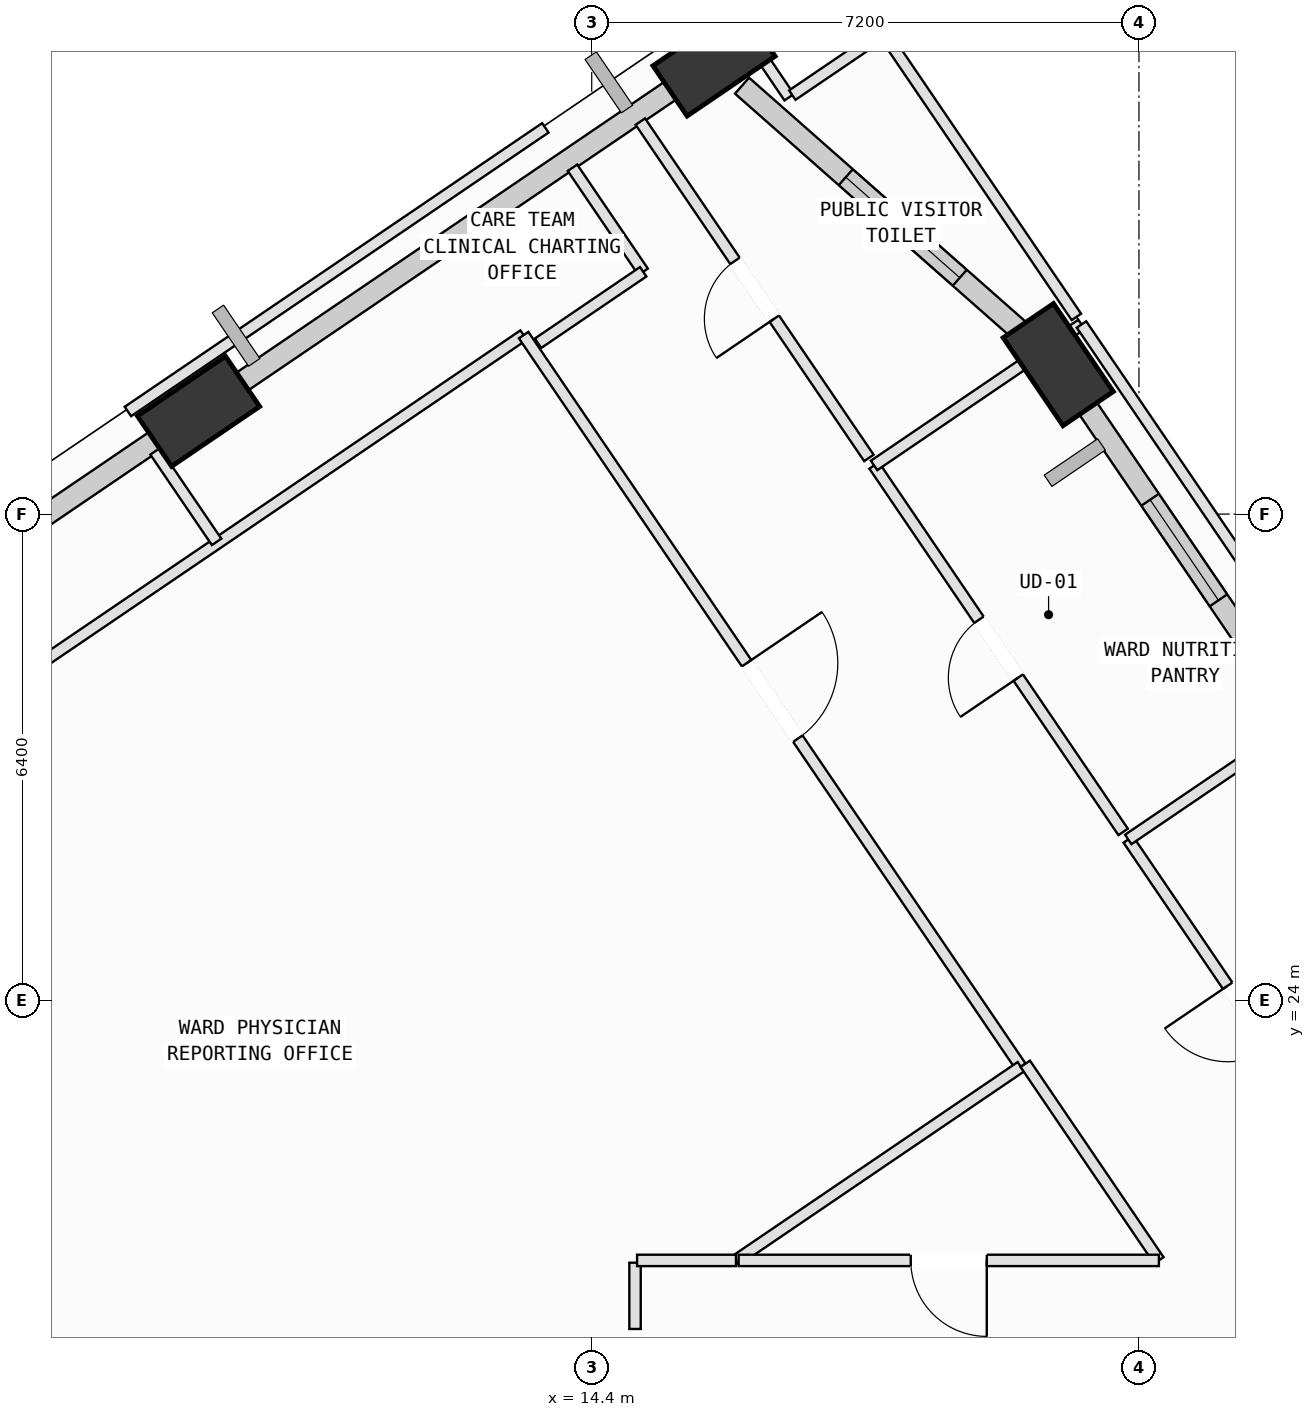
"""IFC4 building model, lengths in metres.
Left out: names, types, materials, properties, quantities, classifications, styles, units other than length and angle.
Written with IfcOpenShell. Run it as: python <this file> out.ifc"""

import sys

from ifc_helpers import new_model, si_unit, direction, frame, frame_2d, origin, origin_2d, place, context, subcontext, project, spatial, rectangle, extrude, element, fill, save


model = new_model("IFC4")
c1 = context("Model", 3, precision=1e-05, world=origin(), true_north=direction((0.0, 1.0)))
c2 = subcontext(c1, "Body", "Model", "MODEL_VIEW")
j1 = project(units=[si_unit("LENGTHUNIT", "METRE"), si_unit("PLANEANGLEUNIT", "RADIAN")], contexts=[c1])
p1 = place(None, origin())
s1 = spatial("IfcSite", under=j1, at=p1, CompositionType="ELEMENT")
p2 = place(p1, origin())
s2 = spatial("IfcBuilding", under=s1, at=p2, CompositionType="ELEMENT")
p3 = place(p2, frame((0.0, 0.0, 169.8)))
s3 = spatial("IfcBuildingStorey", under=s2, at=p3, CompositionType="ELEMENT", Elevation=169.8)
p4 = place(p3, frame((20.538, 32.366, 0.002), z_axis=(-0.030851806234, -0.054265034679, 0.998049834459), x_axis=(-0.080649330283, 0.995404549796, 0.051628168379)))
e1 = element("IfcColumn", 1, at=p4, inside=s3, PredefinedType="COLUMN", context=c2, shape_type="SweptSolid", body=[
    extrude(rectangle(XDim=1.4, YDim=0.8, at=origin_2d()), origin(), (0.0, 0.0, 1.0), 4.004),
])
p5 = place(p3, frame((16.009, 36.362, 0.002), z_axis=(-0.047105602248, -0.07303194147, 0.996216541602), x_axis=(0.99855811031, 0.022260915864, 0.048848254409)))
e2 = element("IfcColumn", 2, at=p5, inside=s3, PredefinedType="COLUMN", context=c2, shape_type="SweptSolid", body=[
    extrude(rectangle(XDim=1.4, YDim=0.8, at=origin_2d()), origin(), (0.0, 0.0, 1.0), 4.011),
])
p6 = place(p3, frame((9.227, 31.753, 0.002), z_axis=(-0.027826504823, -0.10073437772, 0.994524142882), x_axis=(0.946066222421, 0.318603384358, 0.058741691071)))
e3 = element("IfcColumn", 3, at=p6, inside=s3, PredefinedType="COLUMN", context=c2, shape_type="SweptSolid", body=[
    extrude(rectangle(XDim=1.4, YDim=0.8, at=origin_2d()), origin(), (0.0, 0.0, 1.0), 4.018),
])
p7 = place(p3, frame((24.339, 26.774, 0.0), z_axis=(0.0, 0.0, 1.0), x_axis=(-0.56206639417, 0.827092116118, 0.0)))
e4 = element("IfcWall", 4, at=p7, inside=s3, PredefinedType="SOLIDWALL", context=c2, shape_type="SweptSolid", body=[
    extrude(rectangle(XDim=6.223, YDim=0.28, at=frame_2d((3.111, 0.0))), origin(), (0.0, 0.0, 1.0), 3.145),
])
p8 = place(p7, frame((3.011, 0.0, 0.75)))
e5 = element("IfcOpeningElement", 5, at=p8, cuts=e4, PredefinedType="OPENING", context=c2, shape_type="SweptSolid", body=[
    extrude(rectangle(XDim=1.6, YDim=1.95, at=frame_2d((0.8, 0.975))), frame((0.0, 0.15, 0.0), z_axis=(0.0, -1.0, 0.0), x_axis=(1.0, 0.0, 0.0)), (0.0, 0.0, 1.0), 0.3),
])
p9 = place(p3, frame((16.378, 36.037, 0.0), z_axis=(0.0, 0.0, 1.0), x_axis=(0.74990080613, -0.661550286045, 0.0)))
e6 = element("IfcWall", 6, at=p9, inside=s3, PredefinedType="SOLIDWALL", context=c2, shape_type="SweptSolid", body=[
    extrude(rectangle(XDim=5.093, YDim=0.28, at=frame_2d((2.546, 0.0))), origin(), (0.0, 0.0, 1.0), 3.145),
])
p10 = place(p9, frame((1.82, 0.0, 0.75)))
e7 = element("IfcOpeningElement", 7, at=p10, cuts=e6, PredefinedType="OPENING", context=c2, shape_type="SweptSolid", body=[
    extrude(rectangle(XDim=2.0, YDim=1.95, at=frame_2d((1.0, 0.975))), frame((0.0, 0.15, 0.0), z_axis=(0.0, -1.0, 0.0), x_axis=(1.0, 0.0, 0.0)), (0.0, 0.0, 1.0), 0.3),
])
p11 = place(p3, frame((9.49, 31.931, 0.0), z_axis=(0.0, 0.0, 1.0), x_axis=(0.827077196418, 0.562088348184, 0.0)))
e8 = element("IfcWall", 8, at=p11, inside=s3, PredefinedType="SOLIDWALL", context=c2, shape_type="SweptSolid", body=[
    extrude(rectangle(XDim=7.23, YDim=0.28, at=frame_2d((3.615, 0.0))), origin(), (0.0, 0.0, 1.0), 3.165),
])
p12 = place(p3, frame((2.688, 27.308, 0.0), z_axis=(0.0, 0.0, 1.0), x_axis=(0.827083252046, 0.562079437611, 0.0)))
e9 = element("IfcWall", 9, at=p12, inside=s3, PredefinedType="SOLIDWALL", context=c2, shape_type="SweptSolid", body=[
    extrude(rectangle(XDim=7.27, YDim=0.28, at=frame_2d((3.635, 0.0))), origin(), (0.0, 0.0, 1.0), 3.165),
])
p13 = place(p3, frame((14.97, 20.55, 0.0), z_axis=(0.0, 0.0, 1.0), x_axis=(0.0, -1.0, 0.0)))
e10 = element("IfcWall", 10, at=p13, inside=s3, PredefinedType="PARTITIONING", context=c2, shape_type="SweptSolid", body=[
    extrude(rectangle(XDim=0.872, YDim=0.15, at=frame_2d((0.436, 0.0))), origin(), (0.0, 0.0, 1.0), 3.78),
])
p14 = place(p3, frame((2.528, 25.296, 0.0), z_axis=(0.0, 0.0, 1.0), x_axis=(0.827086951532, 0.562073993888, 0.0)))
e11 = element("IfcWall", 11, at=p14, inside=s3, PredefinedType="PARTITIONING", context=c2, shape_type="SweptSolid", body=[
    extrude(rectangle(XDim=13.271, YDim=0.15, at=frame_2d((6.635, 0.0))), origin(), (0.0, 0.0, 1.0), 3.78),
])
p15 = place(p3, frame((13.504, 32.755, 0.0), z_axis=(0.0, 0.0, 1.0), x_axis=(0.562055261363, -0.827099681522, 0.0)))
e12 = element("IfcWall", 12, at=p15, inside=s3, PredefinedType="PARTITIONING", context=c2, shape_type="SweptSolid", body=[
    extrude(rectangle(XDim=11.639, YDim=0.15, at=frame_2d((5.82, 0.0))), origin(), (0.0, 0.0, 1.0), 3.78),
])
p16 = place(p15, frame((5.22, 0.0, 0.0)))
e13 = element("IfcOpeningElement", 13, at=p16, cuts=e12, PredefinedType="OPENING", context=c2, shape_type="SweptSolid", body=[
    extrude(rectangle(XDim=1.2, YDim=2.15, at=frame_2d((0.6, 1.075))), frame((0.0, 0.085, 0.0), z_axis=(0.0, -1.0, 0.0), x_axis=(1.0, 0.0, 0.0)), (0.0, 0.0, 1.0), 0.17),
])
p17 = place(p3, frame((20.046, 23.128, 0.0), z_axis=(0.0, 0.0, 1.0), x_axis=(-0.826993630253, -0.562211290816, 0.0)))
e14 = element("IfcWall", 14, at=p17, inside=s3, PredefinedType="PARTITIONING", context=c2, shape_type="SweptSolid", body=[
    extrude(rectangle(XDim=4.532, YDim=0.15, at=frame_2d((2.266, 0.0))), origin(), (0.0, 0.0, 1.0), 3.78),
])
p18 = place(p3, frame((16.298, 20.58, 0.0), z_axis=(0.0, 0.0, 1.0), x_axis=(-1.0, 0.0, 0.0)))
e15 = element("IfcWall", 15, at=p18, inside=s3, PredefinedType="PARTITIONING", context=c2, shape_type="SweptSolid", body=[
    extrude(rectangle(XDim=1.301, YDim=0.15, at=frame_2d((0.65, 0.0))), origin(), (0.0, 0.0, 1.0), 3.78),
])
p19 = place(p3, frame((24.638, 21.442, 0.0), z_axis=(0.0, 0.0, 1.0), x_axis=(-0.56213996743, 0.827042113207, 0.0)))
e16 = element("IfcWall", 16, at=p19, inside=s3, PredefinedType="PARTITIONING", context=c2, shape_type="SweptSolid", body=[
    extrude(rectangle(XDim=5.655, YDim=0.15, at=frame_2d((2.828, 0.0))), origin(), (0.0, 0.0, 1.0), 3.415),
])
p20 = place(p19, frame((2.328, 0.0, 0.0)))
e17 = element("IfcOpeningElement", 17, at=p20, cuts=e16, PredefinedType="OPENING", context=c2, shape_type="SweptSolid", body=[
    extrude(rectangle(XDim=1.0, YDim=2.12, at=frame_2d((0.5, 1.06))), frame((0.0, 0.085, 0.0), z_axis=(0.0, -1.0, 0.0), x_axis=(1.0, 0.0, 0.0)), (0.0, 0.0, 1.0), 0.17),
])
p21 = place(p3, frame((21.459, 26.119, 0.0), z_axis=(0.0, 0.0, 1.0), x_axis=(0.827129756528, 0.562011001552, 0.0)))
e18 = element("IfcWall", 18, at=p21, inside=s3, PredefinedType="PARTITIONING", context=c2, shape_type="SweptSolid", body=[
    extrude(rectangle(XDim=2.635, YDim=0.15, at=frame_2d((1.318, 0.0))), origin(), (0.0, 0.0, 1.0), 3.78),
])
p22 = place(p3, frame((21.392, 26.218, 0.0), z_axis=(0.0, 0.0, 1.0), x_axis=(-0.562090088282, 0.827076013831, 0.0)))
e19 = element("IfcWall", 19, at=p22, inside=s3, PredefinedType="PARTITIONING", context=c2, shape_type="SweptSolid", body=[
    extrude(rectangle(XDim=5.83, YDim=0.15, at=frame_2d((2.915, 0.0))), origin(), (0.0, 0.0, 1.0), 3.78),
])
p23 = place(p22, frame((2.455, 0.0, 0.0)))
e20 = element("IfcOpeningElement", 20, at=p23, cuts=e19, PredefinedType="OPENING", context=c2, shape_type="SweptSolid", body=[
    extrude(rectangle(XDim=0.92, YDim=2.1, at=frame_2d((0.46, 1.05))), frame((0.0, 0.085, 0.0), z_axis=(0.0, -1.0, 0.0), x_axis=(1.0, 0.0, 0.0)), (0.0, 0.0, 1.0), 0.17),
])
p24 = place(p3, frame((18.115, 31.04, 0.0), z_axis=(0.0, 0.0, 1.0), x_axis=(0.827031073884, 0.562156208567, 0.0)))
e21 = element("IfcWall", 21, at=p24, inside=s3, PredefinedType="PARTITIONING", context=c2, shape_type="SweptSolid", body=[
    extrude(rectangle(XDim=3.3, YDim=0.15, at=frame_2d((1.65, 0.0))), origin(), (0.0, 0.0, 1.0), 3.78),
])
p25 = place(p3, frame((20.844, 32.895, 0.0), z_axis=(0.0, 0.0, 1.0), x_axis=(0.562090088282, -0.827076013831, 0.0)))
e22 = element("IfcWall", 22, at=p25, inside=s3, PredefinedType="PARTITIONING", context=c2, shape_type="SweptSolid", body=[
    extrude(rectangle(XDim=5.83, YDim=0.15, at=frame_2d((2.915, 0.0))), origin(), (0.0, 0.0, 1.0), 3.78),
])
p26 = place(p3, frame((18.239, 36.728, 0.0), z_axis=(0.0, 0.0, 1.0), x_axis=(0.562139923025, -0.827042143389, 0.0)))
e23 = element("IfcWall", 23, at=p26, inside=s3, PredefinedType="PARTITIONING", context=c2, shape_type="SweptSolid", body=[
    extrude(rectangle(XDim=4.515, YDim=0.15, at=frame_2d((2.258, 0.0))), origin(), (0.0, 0.0, 1.0), 3.78),
])
p27 = place(p3, frame((18.047, 31.139, 0.0), z_axis=(0.0, 0.0, 1.0), x_axis=(-0.562060362882, 0.827096214764, 0.0)))
e24 = element("IfcWall", 24, at=p27, inside=s3, PredefinedType="PARTITIONING", context=c2, shape_type="SweptSolid", body=[
    extrude(rectangle(XDim=5.35, YDim=0.15, at=frame_2d((2.675, 0.0))), origin(), (0.0, 0.0, 1.0), 3.78),
])
p28 = place(p27, frame((2.215, 0.0, 0.0)))
e25 = element("IfcOpeningElement", 25, at=p28, cuts=e24, PredefinedType="OPENING", context=c2, shape_type="SweptSolid", body=[
    extrude(rectangle(XDim=0.92, YDim=2.1, at=frame_2d((0.46, 1.05))), frame((0.0, 0.085, 0.0), z_axis=(0.0, -1.0, 0.0), x_axis=(1.0, 0.0, 0.0)), (0.0, 0.0, 1.0), 0.17),
])
p29 = place(p3, frame((15.363, 36.152, 0.0), z_axis=(0.0, 0.0, 1.0), x_axis=(0.82720957027, 0.561893519143, 0.0)))
e26 = element("IfcWall", 26, at=p29, inside=s3, PredefinedType="PARTITIONING", context=c2, shape_type="SweptSolid", body=[
    extrude(rectangle(XDim=1.203, YDim=0.15, at=frame_2d((0.601, 0.0))), origin(), (0.0, 0.0, 1.0), 3.165),
])
p30 = place(p3, frame((16.386, 36.787, 0.0), z_axis=(0.0, 0.0, 1.0), x_axis=(0.56145212795, -0.827509219296, 0.0)))
e27 = element("IfcWall", 27, at=p30, inside=s3, PredefinedType="PARTITIONING", context=c2, shape_type="SweptSolid", body=[
    extrude(rectangle(XDim=1.09, YDim=0.15, at=frame_2d((0.545, 0.0))), origin(), (0.0, 0.0, 1.0), 3.78),
])
p31 = place(p3, frame((17.039, 35.913, 0.0), z_axis=(0.0, 0.0, 1.0), x_axis=(0.827328250974, 0.561718759825, 0.0)))
e28 = element("IfcWall", 28, at=p31, inside=s3, PredefinedType="PARTITIONING", context=c2, shape_type="SweptSolid", body=[
    extrude(rectangle(XDim=1.401, YDim=0.15, at=frame_2d((0.7, 0.0))), origin(), (0.0, 0.0, 1.0), 3.78),
])
p32 = place(p3, frame((20.104, 23.167, 0.0), z_axis=(0.0, 0.0, 1.0), x_axis=(0.562081553658, -0.827081813993, 0.0)))
e29 = element("IfcWall", 29, at=p32, inside=s3, PredefinedType="PARTITIONING", context=c2, shape_type="SweptSolid", body=[
    extrude(rectangle(XDim=3.128, YDim=0.15, at=frame_2d((1.564, 0.0))), origin(), (0.0, 0.0, 1.0), 3.78),
])
p33 = place(p3, frame((21.862, 20.58, 0.0), z_axis=(0.0, 0.0, 1.0), x_axis=(-1.0, 0.0, 0.0)))
e30 = element("IfcWall", 30, at=p33, inside=s3, PredefinedType="PARTITIONING", context=c2, shape_type="SweptSolid", body=[
    extrude(rectangle(XDim=5.529, YDim=0.15, at=frame_2d((2.765, 0.0))), origin(), (0.0, 0.0, 1.0), 3.78),
])
p34 = place(p33, frame((2.264, 0.0, 0.0)))
e31 = element("IfcOpeningElement", 31, at=p34, cuts=e30, PredefinedType="OPENING", context=c2, shape_type="SweptSolid", body=[
    extrude(rectangle(XDim=1.0, YDim=2.12, at=frame_2d((0.5, 1.06))), frame((0.0, 0.085, 0.0), z_axis=(0.0, -1.0, 0.0), x_axis=(1.0, 0.0, 0.0)), (0.0, 0.0, 1.0), 0.17),
])
p35 = place(p3, frame((9.465, 30.034, 0.0), z_axis=(0.0, 0.0, 1.0), x_axis=(-0.562342471098, 0.826904435349, 0.0)))
e32 = element("IfcWall", 32, at=p35, inside=s3, PredefinedType="PARTITIONING", context=c2, shape_type="SweptSolid", body=[
    extrude(rectangle(XDim=1.44, YDim=0.15, at=frame_2d((0.72, 0.0))), origin(), (0.0, 0.0, 1.0), 3.78),
])
p36 = place(p3, frame((8.298, 31.75, 0.0), z_axis=(0.0, 0.0, 1.0), x_axis=(0.827107686856, 0.56204348083, 0.0)))
e33 = element("IfcWall", 33, at=p36, inside=s3, PredefinedType="PARTITIONING", context=c2, shape_type="SweptSolid", body=[
    extrude(rectangle(XDim=6.64, YDim=0.15, at=frame_2d((3.32, 0.0))), origin(), (0.0, 0.0, 1.0), 3.78),
])
p37 = place(p3, frame((14.147, 34.957, 0.0), z_axis=(0.0, 0.0, 1.0), x_axis=(0.561862085879, -0.827230920875, 0.0)))
e34 = element("IfcWall", 34, at=p37, inside=s3, PredefinedType="PARTITIONING", context=c2, shape_type="SweptSolid", body=[
    extrude(rectangle(XDim=1.655, YDim=0.15, at=frame_2d((0.828, 0.0))), origin(), (0.0, 0.0, 1.0), 3.78),
])
p38 = place(p3, frame((15.077, 33.588, 0.0), z_axis=(0.0, 0.0, 1.0), x_axis=(-0.827029689207, -0.562158245665, 0.0)))
e35 = element("IfcWall", 35, at=p38, inside=s3, PredefinedType="PARTITIONING", context=c2, shape_type="SweptSolid", body=[
    extrude(rectangle(XDim=1.672, YDim=0.15, at=frame_2d((0.836, 0.0))), origin(), (0.0, 0.0, 1.0), 3.78),
])
p39 = place(p8, origin())
e36 = element("IfcWindow", 36, at=p39, inside=s3, PartitioningType="SINGLE_PANEL", PredefinedType="WINDOW", context=c2, shape_type="SweptSolid", body=[
    extrude(rectangle(XDim=1.6, YDim=1.95, at=frame_2d((0.8, 0.975))), frame((0.0, 0.03, 0.0), z_axis=(0.0, -1.0, 0.0), x_axis=(1.0, 0.0, 0.0)), (0.0, 0.0, 1.0), 0.06),
])
fill(e5, e36)
p40 = place(p10, origin())
e37 = element("IfcWindow", 37, at=p40, inside=s3, PartitioningType="SINGLE_PANEL", PredefinedType="WINDOW", context=c2, shape_type="SweptSolid", body=[
    extrude(rectangle(XDim=2.0, YDim=1.95, at=frame_2d((1.0, 0.975))), frame((0.0, 0.03, 0.0), z_axis=(0.0, -1.0, 0.0), x_axis=(1.0, 0.0, 0.0)), (0.0, 0.0, 1.0), 0.06),
])
fill(e7, e37)
p41 = place(p16, origin())
e38 = element("IfcDoor", 38, at=p41, inside=s3, OperationType="SINGLE_SWING_LEFT", PredefinedType="DOOR", context=c2, shape_type="SweptSolid", body=[
    extrude(rectangle(XDim=1.2, YDim=2.15, at=frame_2d((0.6, 1.075))), frame((0.0, 0.025, 0.0), z_axis=(0.0, -1.0, 0.0), x_axis=(1.0, 0.0, 0.0)), (0.0, 0.0, 1.0), 0.05),
])
fill(e13, e38)
p42 = place(p20, origin())
e39 = element("IfcDoor", 39, at=p42, inside=s3, OperationType="SINGLE_SWING_RIGHT", PredefinedType="DOOR", context=c2, shape_type="SweptSolid", body=[
    extrude(rectangle(XDim=1.0, YDim=2.12, at=frame_2d((0.5, 1.06))), frame((0.0, 0.025, 0.0), z_axis=(0.0, -1.0, 0.0), x_axis=(1.0, 0.0, 0.0)), (0.0, 0.0, 1.0), 0.05),
])
fill(e17, e39)
p43 = place(p23, origin())
e40 = element("IfcDoor", 40, at=p43, inside=s3, OperationType="SINGLE_SWING_LEFT", PredefinedType="DOOR", context=c2, shape_type="SweptSolid", body=[
    extrude(rectangle(XDim=0.92, YDim=2.1, at=frame_2d((0.46, 1.05))), frame((0.0, 0.025, 0.0), z_axis=(0.0, -1.0, 0.0), x_axis=(1.0, 0.0, 0.0)), (0.0, 0.0, 1.0), 0.05),
])
fill(e20, e40)
p44 = place(p28, origin())
e41 = element("IfcDoor", 41, at=p44, inside=s3, OperationType="SINGLE_SWING_LEFT", PredefinedType="DOOR", context=c2, shape_type="SweptSolid", body=[
    extrude(rectangle(XDim=0.92, YDim=2.1, at=frame_2d((0.46, 1.05))), frame((0.0, 0.025, 0.0), z_axis=(0.0, -1.0, 0.0), x_axis=(1.0, 0.0, 0.0)), (0.0, 0.0, 1.0), 0.05),
])
fill(e25, e41)
p45 = place(p34, origin())
e42 = element("IfcDoor", 42, at=p45, inside=s3, OperationType="SINGLE_SWING_LEFT", PredefinedType="DOOR", context=c2, shape_type="SweptSolid", body=[
    extrude(rectangle(XDim=1.0, YDim=2.12, at=frame_2d((0.5, 1.06))), frame((0.0, 0.025, 0.0), z_axis=(0.0, -1.0, 0.0), x_axis=(1.0, 0.0, 0.0)), (0.0, 0.0, 1.0), 0.05),
])
fill(e31, e42)
save(model, sys.argv[1])
